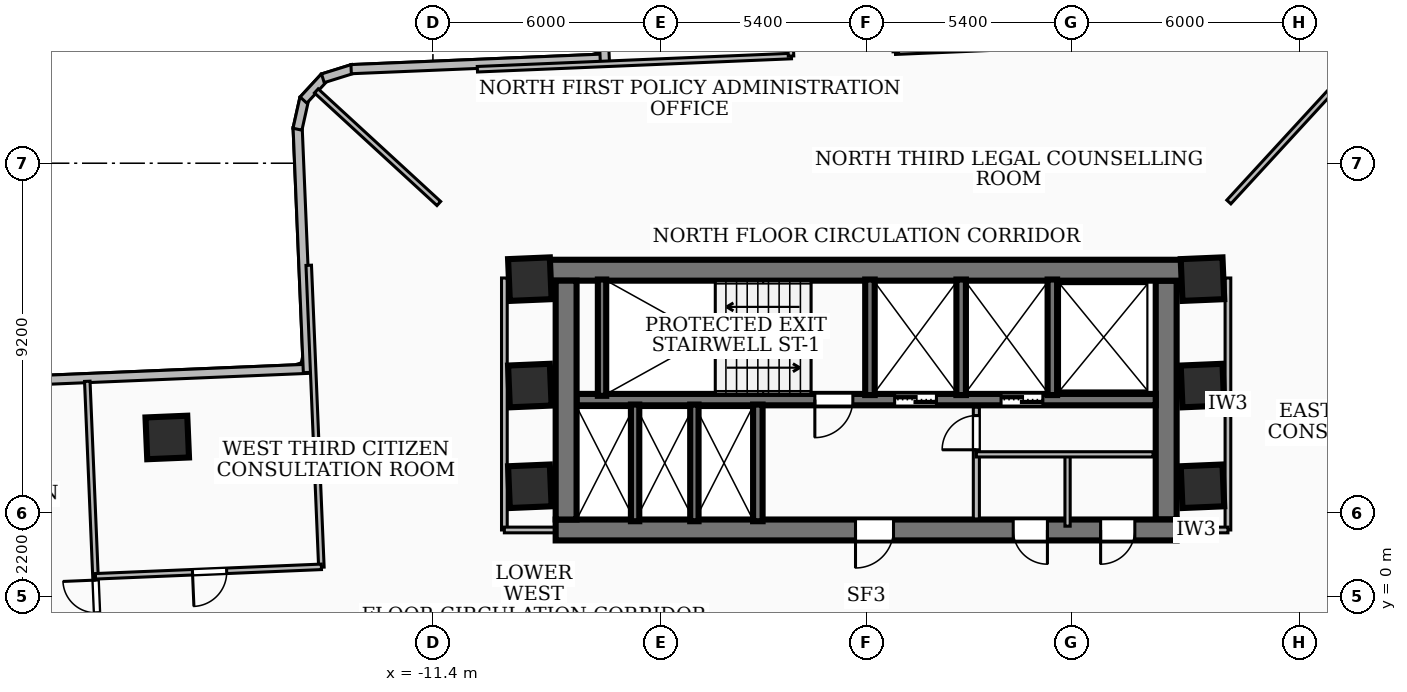
"""IFC4 building model, lengths in metres.
Left out: names, types, materials, properties, quantities, classifications, styles, units other than length and angle.
Written with IfcOpenShell. Run it as: python <this file> out.ifc"""

import sys

from ifc_helpers import new_model, si_unit, direction, frame, frame_2d, origin, origin_2d, place, context, subcontext, project, spatial, rectangle, extrude, element, fill, save


model = new_model("IFC4")
c1 = context("Model", 3, precision=1e-05, world=origin(), true_north=direction((0.0, 1.0)))
c2 = subcontext(c1, "Body", "Model", "MODEL_VIEW")
j1 = project(units=[si_unit("LENGTHUNIT", "METRE"), si_unit("PLANEANGLEUNIT", "RADIAN")], contexts=[c1])
p1 = place(None, origin())
s1 = spatial("IfcSite", under=j1, at=p1, CompositionType="ELEMENT")
p2 = place(p1, origin())
s2 = spatial("IfcBuilding", under=s1, at=p2, CompositionType="ELEMENT")
p3 = place(p2, frame((0.0, 0.0, 46.08)))
s3 = spatial("IfcBuildingStorey", under=s2, at=p3, CompositionType="ELEMENT", Elevation=46.08)
p4 = place(p3, frame((-8.78, 8.585, 0.0), z_axis=(0.0, 0.0, 1.0), x_axis=(1.0, 0.0, 0.0)))
e1 = element("IfcWall", 1, at=p4, inside=s3, PredefinedType="SHEAR", context=c2, shape_type="SweptSolid", body=[
    extrude(rectangle(XDim=17.56, YDim=0.55, at=frame_2d((8.78, 0.0))), origin(), (0.0, 0.0, 1.0), 3.32),
])
p5 = place(p3, frame((8.17, 1.75, 0.0), z_axis=(0.0, 0.0, 1.0), x_axis=(-1.0, 0.0, 0.0)))
e2 = element("IfcWall", 2, at=p5, inside=s3, PredefinedType="SHEAR", context=c2, shape_type="SweptSolid", body=[
    extrude(rectangle(XDim=16.34, YDim=0.55, at=frame_2d((8.17, 0.0))), origin(), (0.0, 0.0, 1.0), 3.32),
])
p6 = place(p5, frame((7.45, 0.0, 0.0)))
e3 = element("IfcOpeningElement", 3, at=p6, cuts=e2, PredefinedType="OPENING", context=c2, shape_type="SweptSolid", body=[
    extrude(rectangle(XDim=1.0, YDim=2.1, at=frame_2d((0.5, 1.05))), frame((0.0, 0.285, 0.0), z_axis=(0.0, -1.0, 0.0), x_axis=(1.0, 0.0, 0.0)), (0.0, 0.0, 1.0), 0.57),
])
p7 = place(p5, frame((3.4, 0.0, 0.0)))
e4 = element("IfcOpeningElement", 4, at=p7, cuts=e2, PredefinedType="OPENING", context=c2, shape_type="SweptSolid", body=[
    extrude(rectangle(XDim=0.9, YDim=2.06, at=frame_2d((0.45, 1.03))), frame((0.0, 0.285, 0.0), z_axis=(0.0, -1.0, 0.0), x_axis=(1.0, 0.0, 0.0)), (0.0, 0.0, 1.0), 0.57),
])
p8 = place(p5, frame((1.1, 0.0, 0.0)))
e5 = element("IfcOpeningElement", 5, at=p8, cuts=e2, PredefinedType="OPENING", context=c2, shape_type="SweptSolid", body=[
    extrude(rectangle(XDim=0.9, YDim=2.06, at=frame_2d((0.45, 1.03))), frame((0.0, 0.285, 0.0), z_axis=(0.0, -1.0, 0.0), x_axis=(1.0, 0.0, 0.0)), (0.0, 0.0, 1.0), 0.57),
])
for number, where, z_axis, x_axis in (
    (6, (-7.895, 2.025, 0.0), (0.0, 0.0, 1.0), (0.0, 1.0, 0.0)),
    (7, (7.895, 8.31, 0.0), (0.0, 0.0, 1.0), (0.0, -1.0, 0.0)),
):
    element("IfcWall", number, at=place(p3, frame(where, z_axis=z_axis, x_axis=x_axis)), inside=s3, PredefinedType="SHEAR", context=c2, shape_type="SweptSolid", body=[
        extrude(rectangle(XDim=6.285, YDim=0.55, at=frame_2d((3.143, 0.0))), origin(), (0.0, 0.0, 1.0), 3.32),
    ])
p9 = place(p3, frame((7.62, 5.18, 0.0), z_axis=(0.0, 0.0, 1.0), x_axis=(-1.0, 0.0, 0.0)))
e8 = element("IfcWall", 8, at=p9, inside=s3, PredefinedType="SOLIDWALL", context=c2, shape_type="SweptSolid", body=[
    extrude(rectangle(XDim=15.24, YDim=0.3, at=frame_2d((7.62, 0.0))), origin(), (0.0, 0.0, 1.0), 3.32),
])
p10 = place(p9, frame((5.77, 0.0, 0.0)))
e9 = element("IfcOpeningElement", 9, at=p10, cuts=e8, PredefinedType="OPENING", context=c2, shape_type="SweptSolid", body=[
    extrude(rectangle(XDim=1.1, YDim=2.15, at=frame_2d((0.55, 1.075))), frame((0.0, 0.16, 0.0), z_axis=(0.0, -1.0, 0.0), x_axis=(1.0, 0.0, 0.0)), (0.0, 0.0, 1.0), 0.32),
])
p11 = place(p9, frame((2.97, 0.0, 0.0)))
e10 = element("IfcOpeningElement", 10, at=p11, cuts=e8, PredefinedType="OPENING", context=c2, shape_type="SweptSolid", body=[
    extrude(rectangle(XDim=1.1, YDim=2.15, at=frame_2d((0.55, 1.075))), frame((0.0, 0.16, 0.0), z_axis=(0.0, -1.0, 0.0), x_axis=(1.0, 0.0, 0.0)), (0.0, 0.0, 1.0), 0.32),
])
p12 = place(p9, frame((7.97, 0.0, 0.0)))
e11 = element("IfcOpeningElement", 11, at=p12, cuts=e8, PredefinedType="OPENING", context=c2, shape_type="SweptSolid", body=[
    extrude(rectangle(XDim=1.0, YDim=2.1, at=frame_2d((0.5, 1.05))), frame((0.0, 0.16, 0.0), z_axis=(0.0, -1.0, 0.0), x_axis=(1.0, 0.0, 0.0)), (0.0, 0.0, 1.0), 0.32),
])
p13 = place(p3, frame((-6.95, 5.28, 0.0), z_axis=(0.0, 0.0, 1.0), x_axis=(0.0, 1.0, 0.0)))
e12 = element("IfcWall", 12, at=p13, inside=s3, PredefinedType="SOLIDWALL", context=c2, shape_type="SweptSolid", body=[
    extrude(rectangle(XDim=3.06, YDim=0.22, at=frame_2d((1.53, 0.0))), origin(), (0.0, 0.0, 1.0), 3.32),
])
for number, where, z_axis, x_axis in (
    (13, (0.1, 5.3, 0.0), (0.0, 0.0, 1.0), (0.0, 1.0, 0.0)),
    (14, (2.5, 5.3, 0.0), (0.0, 0.0, 1.0), (0.0, 1.0, 0.0)),
    (15, (4.9, 5.3, 0.0), (0.0, 0.0, 1.0), (0.0, 1.0, 0.0)),
):
    element("IfcWall", number, at=place(p3, frame(where, z_axis=z_axis, x_axis=x_axis)), inside=s3, PredefinedType="SOLIDWALL", context=c2, shape_type="SweptSolid", body=[
        extrude(rectangle(XDim=3.04, YDim=0.25, at=frame_2d((1.52, 0.0))), origin(), (0.0, 0.0, 1.0), 3.32),
    ])
p14 = place(p3, frame((-2.85, 1.98, 0.0), z_axis=(0.0, 0.0, 1.0), x_axis=(0.0, 1.0, 0.0)))
e16 = element("IfcWall", 16, at=p14, inside=s3, PredefinedType="SOLIDWALL", context=c2, shape_type="SweptSolid", body=[
    extrude(rectangle(XDim=3.07, YDim=0.25, at=frame_2d((1.535, 0.0))), origin(), (0.0, 0.0, 1.0), 3.32),
])
for number, where, z_axis, x_axis in (
    (17, (-6.08, 1.98, 0.0), (0.0, 0.0, 1.0), (0.0, 1.0, 0.0)),
    (18, (-4.52, 1.98, 0.0), (0.0, 0.0, 1.0), (0.0, 1.0, 0.0)),
):
    element("IfcWall", number, at=place(p3, frame(where, z_axis=z_axis, x_axis=x_axis)), inside=s3, PredefinedType="SOLIDWALL", context=c2, shape_type="SweptSolid", body=[
        extrude(rectangle(XDim=3.07, YDim=0.22, at=frame_2d((1.535, 0.0))), origin(), (0.0, 0.0, 1.0), 3.32),
    ])
for number, where, z_axis, x_axis in (
    (19, (-8.85, 2.9, 0.0), (0.0, 0.0, 1.0), (0.999, 0.042, 0.0)),
    (20, (-8.85, 5.55, 0.0), (0.0, 0.0, 1.0), (0.999, 0.042, 0.0)),
    (21, (8.85, 2.9, 0.0), (0.0, 0.0, 1.0), (0.999, 0.042, 0.0)),
    (22, (8.85, 5.55, 0.0), (0.0, 0.0, 1.0), (0.999, 0.042, 0.0)),
    (23, (-8.85, 8.35, 0.0), (0.0, 0.0, 1.0), (0.999, 0.042, 0.0)),
    (24, (8.85, 8.35, 0.0), (0.0, 0.0, 1.0), (0.999, 0.042, 0.0)),
    (25, (-18.391, 4.184, 0.0), (0.0, 0.0, 1.0), (0.999, 0.042, 0.0)),
):
    element("IfcColumn", number, at=place(p3, frame(where, z_axis=z_axis, x_axis=x_axis)), inside=s3, PredefinedType="COLUMN", context=c2, shape_type="SweptSolid", body=[
        extrude(rectangle(XDim=1.1, YDim=1.1, at=origin_2d()), origin(), (0.0, 0.0, 1.0), 3.6),
    ])
p15 = place(p3, frame((-31.458, 5.287, 0.0), z_axis=(0.0, 0.0, 1.0), x_axis=(0.999122484842, 0.041883890494, 0.0)))
e26 = element("IfcWall", 26, at=p15, inside=s3, PredefinedType="SOLIDWALL", context=c2, shape_type="SweptSolid", body=[
    extrude(rectangle(XDim=16.875, YDim=0.24, at=frame_2d((8.438, 0.0))), origin(), (0.0, 0.0, 1.0), 3.32),
])
p16 = place(p15, frame((1.1, 0.0, 0.85)))
e27 = element("IfcOpeningElement", 27, at=p16, cuts=e26, PredefinedType="OPENING", context=c2, shape_type="SweptSolid", body=[
    extrude(rectangle(XDim=2.1, YDim=1.8, at=frame_2d((1.05, 0.9))), frame((0.0, 0.13, 0.0), z_axis=(0.0, -1.0, 0.0), x_axis=(1.0, 0.0, 0.0)), (0.0, 0.0, 1.0), 0.26),
])
p17 = place(p3, frame((-14.69, 5.894, 0.0), z_axis=(0.0, 0.0, 1.0), x_axis=(-0.041827173477, 0.999124860845, 0.0)))
e28 = element("IfcWall", 28, at=p17, inside=s3, PredefinedType="SOLIDWALL", context=c2, shape_type="SweptSolid", body=[
    extrude(rectangle(XDim=6.456, YDim=0.24, at=frame_2d((3.228, 0.0))), origin(), (0.0, 0.0, 1.0), 3.32),
])
p18 = place(p3, frame((-14.964, 12.295, 0.0), z_axis=(0.0, 0.0, 1.0), x_axis=(0.21736704137, 0.976089939158, 0.0)))
e29 = element("IfcWall", 29, at=p18, inside=s3, PredefinedType="SOLIDWALL", context=c2, shape_type="SweptSolid", body=[
    extrude(rectangle(XDim=0.829, YDim=0.24, at=frame_2d((0.415, 0.0))), origin(), (0.0, 0.0, 1.0), 3.32),
])
p19 = place(p3, frame((-14.806, 13.062, 0.0), z_axis=(0.0, 0.0, 1.0), x_axis=(0.677693750404, 0.735344259965, 0.0)))
e30 = element("IfcWall", 30, at=p19, inside=s3, PredefinedType="SOLIDWALL", context=c2, shape_type="SweptSolid", body=[
    extrude(rectangle(XDim=0.813, YDim=0.24, at=frame_2d((0.406, 0.0))), origin(), (0.0, 0.0, 1.0), 3.32),
])
p20 = place(p3, frame((-14.296, 13.635, 0.0), z_axis=(0.0, 0.0, 1.0), x_axis=(0.954396284631, 0.298542680168, 0.0)))
e31 = element("IfcWall", 31, at=p20, inside=s3, PredefinedType="SOLIDWALL", context=c2, shape_type="SweptSolid", body=[
    extrude(rectangle(XDim=0.831, YDim=0.24, at=frame_2d((0.416, 0.0))), origin(), (0.0, 0.0, 1.0), 3.32),
])
p21 = place(p3, frame((-13.552, 13.875, 0.0), z_axis=(0.0, 0.0, 1.0), x_axis=(0.999127443157, 0.041765444226, 0.0)))
e32 = element("IfcWall", 32, at=p21, inside=s3, PredefinedType="SOLIDWALL", context=c2, shape_type="SweptSolid", body=[
    extrude(rectangle(XDim=6.775, YDim=0.24, at=frame_2d((3.387, 0.0))), origin(), (0.0, 0.0, 1.0), 3.32),
])
p22 = place(p3, frame((-6.875, 14.058, 0.0), z_axis=(0.0, 0.0, 1.0), x_axis=(-0.041850586852, 0.999123880397, 0.0)))
e33 = element("IfcWall", 33, at=p22, inside=s3, PredefinedType="SOLIDWALL", context=c2, shape_type="SweptSolid", body=[
    extrude(rectangle(XDim=13.476, YDim=0.24, at=frame_2d((6.738, 0.0))), origin(), (0.0, 0.0, 1.0), 3.32),
])
p23 = place(p22, frame((10.276, 0.0, 0.85)))
e34 = element("IfcOpeningElement", 34, at=p23, cuts=e33, PredefinedType="OPENING", context=c2, shape_type="SweptSolid", body=[
    extrude(rectangle(XDim=2.1, YDim=2.0, at=frame_2d((1.05, 1.0))), frame((0.0, 0.13, 0.0), z_axis=(0.0, -1.0, 0.0), x_axis=(1.0, 0.0, 0.0)), (0.0, 0.0, 1.0), 0.26),
])
p24 = place(p3, frame((2.9, 2.04, 0.0), z_axis=(0.0, 0.0, 1.0), x_axis=(0.0, 1.0, 0.0)))
e35 = element("IfcWall", 35, at=p24, inside=s3, PredefinedType="PARTITIONING", context=c2, shape_type="SweptSolid", body=[
    extrude(rectangle(XDim=2.94, YDim=0.16, at=frame_2d((1.47, 0.0))), origin(), (0.0, 0.0, 1.0), 2.385),
])
p25 = place(p24, frame((1.82, 0.0, 0.0)))
e36 = element("IfcOpeningElement", 36, at=p25, cuts=e35, PredefinedType="OPENING", context=c2, shape_type="SweptSolid", body=[
    extrude(rectangle(XDim=0.9, YDim=2.06, at=frame_2d((0.45, 1.03))), frame((0.0, 0.09, 0.0), z_axis=(0.0, -1.0, 0.0), x_axis=(1.0, 0.0, 0.0)), (0.0, 0.0, 1.0), 0.18),
])
p26 = place(p3, frame((2.9, 3.74, 0.0), z_axis=(0.0, 0.0, 1.0), x_axis=(1.0, 0.0, 0.0)))
e37 = element("IfcWall", 37, at=p26, inside=s3, PredefinedType="PARTITIONING", context=c2, shape_type="SweptSolid", body=[
    extrude(rectangle(XDim=4.65, YDim=0.138, at=frame_2d((2.325, 0.0))), origin(), (0.0, 0.0, 1.0), 3.32),
])
p27 = place(p3, frame((5.3, 1.85, 0.0), z_axis=(0.0, 0.0, 1.0), x_axis=(0.0, 1.0, 0.0)))
e38 = element("IfcWall", 38, at=p27, inside=s3, PredefinedType="PARTITIONING", context=c2, shape_type="SweptSolid", body=[
    extrude(rectangle(XDim=1.89, YDim=0.138, at=frame_2d((0.945, 0.0))), origin(), (0.0, 0.0, 1.0), 2.385),
])
p28 = place(p3, frame((-9.52, 1.75, 0.0), z_axis=(0.0, 0.0, 1.0), x_axis=(0.0, 1.0, 0.0)))
e39 = element("IfcWall", 39, at=p28, inside=s3, PredefinedType="PARTITIONING", context=c2, shape_type="SweptSolid", body=[
    extrude(rectangle(XDim=6.63, YDim=0.15, at=frame_2d((3.315, 0.0))), origin(), (0.0, 0.0, 1.0), 2.401),
])
p29 = place(p3, frame((-7.85, 1.75, 0.0), z_axis=(0.0, 0.0, 1.0), x_axis=(-1.0, 0.0, 0.0)))
e40 = element("IfcWall", 40, at=p29, inside=s3, PredefinedType="PARTITIONING", context=c2, shape_type="SweptSolid", body=[
    extrude(rectangle(XDim=1.67, YDim=0.15, at=frame_2d((0.835, 0.0))), origin(), (0.0, 0.0, 1.0), 2.385),
])
p30 = place(p3, frame((9.52, 1.75, 0.0), z_axis=(0.0, 0.0, 1.0), x_axis=(0.0, 1.0, 0.0)))
e41 = element("IfcWall", 41, at=p30, inside=s3, PredefinedType="PARTITIONING", context=c2, shape_type="SweptSolid", body=[
    extrude(rectangle(XDim=6.63, YDim=0.15, at=frame_2d((3.315, 0.0))), origin(), (0.0, 0.0, 1.0), 2.401),
])
p31 = place(p3, frame((7.85, 1.75, 0.0), z_axis=(0.0, 0.0, 1.0), x_axis=(1.0, 0.0, 0.0)))
e42 = element("IfcWall", 42, at=p31, inside=s3, PredefinedType="PARTITIONING", context=c2, shape_type="SweptSolid", body=[
    extrude(rectangle(XDim=1.67, YDim=0.15, at=frame_2d((0.835, 0.0))), origin(), (0.0, 0.0, 1.0), 2.385),
])
p32 = place(p3, frame((9.544, 10.38, 0.0), z_axis=(0.0, 0.0, 1.0), x_axis=(0.676856513188, 0.736114977809, 0.0)))
e43 = element("IfcWall", 43, at=p32, inside=s3, PredefinedType="PARTITIONING", context=c2, shape_type="SweptSolid", body=[
    extrude(rectangle(XDim=5.554, YDim=0.145, at=frame_2d((2.777, 0.0))), origin(), (0.0, 0.0, 1.0), 2.624),
])
p33 = place(p3, frame((-11.245, 10.34, 0.0), z_axis=(0.0, 0.0, 1.0), x_axis=(-0.736178820698, 0.676787074312, 0.0)))
e44 = element("IfcWall", 44, at=p33, inside=s3, PredefinedType="PARTITIONING", context=c2, shape_type="SweptSolid", body=[
    extrude(rectangle(XDim=4.378, YDim=0.145, at=frame_2d((2.189, 0.0))), origin(), (0.0, 0.0, 1.0), 3.32),
])
p34 = place(p3, frame((-1.967, 14.22, 0.0), z_axis=(0.0, 0.0, 1.0), x_axis=(-0.99911977153, -0.041948565382, 0.0)))
e45 = element("IfcWall", 45, at=p34, inside=s3, PredefinedType="PARTITIONING", context=c2, shape_type="SweptSolid", body=[
    extrude(rectangle(XDim=8.27, YDim=0.145, at=frame_2d((4.135, 0.0))), origin(), (0.0, 0.0, 1.0), 2.401),
])
p35 = place(p3, frame((8.714, 14.668, 0.0), z_axis=(0.0, 0.0, 1.0), x_axis=(-0.999122557945, -0.041882146625, 0.0)))
e46 = element("IfcWall", 46, at=p35, inside=s3, PredefinedType="PARTITIONING", context=c2, shape_type="SweptSolid", body=[
    extrude(rectangle(XDim=7.951, YDim=0.145, at=frame_2d((3.976, 0.0))), origin(), (0.0, 0.0, 1.0), 2.401),
])
p36 = place(p3, frame((-2.249, 20.714, 0.0), z_axis=(0.0, 0.0, 1.0), x_axis=(0.041843020894, -0.999124197286, 0.0)))
e47 = element("IfcWall", 47, at=p36, inside=s3, PredefinedType="PARTITIONING", context=c2, shape_type="SweptSolid", body=[
    extrude(rectangle(XDim=6.5, YDim=0.145, at=frame_2d((3.25, 0.0))), origin(), (0.0, 0.0, 1.0), 3.32),
])
p37 = place(p36, frame((4.575, 0.0, 0.0)))
e48 = element("IfcOpeningElement", 48, at=p37, cuts=e47, PredefinedType="OPENING", context=c2, shape_type="SweptSolid", body=[
    extrude(rectangle(XDim=0.86, YDim=2.04, at=frame_2d((0.43, 1.02))), frame((0.0, 0.083, 0.0), z_axis=(0.0, -1.0, 0.0), x_axis=(1.0, 0.0, 0.0)), (0.0, 0.0, 1.0), 0.165),
])
p38 = place(p36, frame((1.325, 0.0, 0.0)))
e49 = element("IfcOpeningElement", 49, at=p38, cuts=e47, PredefinedType="OPENING", context=c2, shape_type="SweptSolid", body=[
    extrude(rectangle(XDim=0.86, YDim=2.04, at=frame_2d((0.43, 1.02))), frame((0.0, 0.083, 0.0), z_axis=(0.0, -1.0, 0.0), x_axis=(1.0, 0.0, 0.0)), (0.0, 0.0, 1.0), 0.165),
])
p39 = place(p3, frame((-14.668, 8.714, 0.0), z_axis=(0.0, 0.0, 1.0), x_axis=(0.041882146625, -0.999122557945, 0.0)))
e50 = element("IfcWall", 50, at=p39, inside=s3, PredefinedType="PARTITIONING", context=c2, shape_type="SweptSolid", body=[
    extrude(rectangle(XDim=7.951, YDim=0.145, at=frame_2d((3.976, 0.0))), origin(), (0.0, 0.0, 1.0), 2.401),
])
p40 = place(p3, frame((-14.335, 0.78, 0.0), z_axis=(0.0, 0.0, 1.0), x_axis=(-0.999123875731, -0.041850698257, 0.0)))
e51 = element("IfcWall", 51, at=p40, inside=s3, PredefinedType="PARTITIONING", context=c2, shape_type="SweptSolid", body=[
    extrude(rectangle(XDim=5.95, YDim=0.145, at=frame_2d((2.975, 0.0))), origin(), (0.0, 0.0, 1.0), 3.32),
])
p41 = place(p40, frame((2.495, 0.0, 0.0)))
e52 = element("IfcOpeningElement", 52, at=p41, cuts=e51, PredefinedType="OPENING", context=c2, shape_type="SweptSolid", body=[
    extrude(rectangle(XDim=0.9, YDim=2.06, at=frame_2d((0.45, 1.03))), frame((0.0, 0.083, 0.0), z_axis=(0.0, -1.0, 0.0), x_axis=(1.0, 0.0, 0.0)), (0.0, 0.0, 1.0), 0.165),
])
p42 = place(p3, frame((-19.963, -7.037, 0.0), z_axis=(0.0, 0.0, 1.0), x_axis=(-0.041873423051, 0.999122923589, 0.0)))
e53 = element("IfcWall", 53, at=p42, inside=s3, PredefinedType="PARTITIONING", context=c2, shape_type="SweptSolid", body=[
    extrude(rectangle(XDim=12.71, YDim=0.145, at=frame_2d((6.355, 0.0))), origin(), (0.0, 0.0, 1.0), 2.401),
])
p43 = place(p42, frame((6.615, 0.0, 0.0)))
e54 = element("IfcOpeningElement", 54, at=p43, cuts=e53, PredefinedType="OPENING", context=c2, shape_type="SweptSolid", body=[
    extrude(rectangle(XDim=0.86, YDim=2.04, at=frame_2d((0.43, 1.02))), frame((0.0, 0.083, 0.0), z_axis=(0.0, -1.0, 0.0), x_axis=(1.0, 0.0, 0.0)), (0.0, 0.0, 1.0), 0.165),
])
p44 = place(p42, frame((5.415, 0.0, 0.0)))
e55 = element("IfcOpeningElement", 55, at=p44, cuts=e53, PredefinedType="OPENING", context=c2, shape_type="SweptSolid", body=[
    extrude(rectangle(XDim=0.86, YDim=2.04, at=frame_2d((0.43, 1.02))), frame((0.0, 0.083, 0.0), z_axis=(0.0, -1.0, 0.0), x_axis=(1.0, 0.0, 0.0)), (0.0, 0.0, 1.0), 0.165),
])
p45 = place(p6, origin())
e56 = element("IfcDoor", 56, at=p45, inside=s3, OperationType="SINGLE_SWING_RIGHT", PredefinedType="DOOR", context=c2, shape_type="SweptSolid", body=[
    extrude(rectangle(XDim=1.0, YDim=2.1, at=frame_2d((0.5, 1.05))), frame((0.0, 0.025, 0.0), z_axis=(0.0, -1.0, 0.0), x_axis=(1.0, 0.0, 0.0)), (0.0, 0.0, 1.0), 0.05),
])
fill(e3, e56)
p46 = place(p10, origin())
e57 = element("IfcDoor", 57, at=p46, inside=s3, OperationType="DOUBLE_DOOR_SLIDING", PredefinedType="DOOR", context=c2, shape_type="SweptSolid", body=[
    extrude(rectangle(XDim=1.1, YDim=2.15, at=frame_2d((0.55, 1.075))), frame((0.0, 0.025, 0.0), z_axis=(0.0, -1.0, 0.0), x_axis=(1.0, 0.0, 0.0)), (0.0, 0.0, 1.0), 0.05),
])
fill(e9, e57)
p47 = place(p11, origin())
e58 = element("IfcDoor", 58, at=p47, inside=s3, OperationType="DOUBLE_DOOR_SLIDING", PredefinedType="DOOR", context=c2, shape_type="SweptSolid", body=[
    extrude(rectangle(XDim=1.1, YDim=2.15, at=frame_2d((0.55, 1.075))), frame((0.0, 0.025, 0.0), z_axis=(0.0, -1.0, 0.0), x_axis=(1.0, 0.0, 0.0)), (0.0, 0.0, 1.0), 0.05),
])
fill(e10, e58)
p48 = place(p12, origin())
e59 = element("IfcDoor", 59, at=p48, inside=s3, OperationType="SINGLE_SWING_RIGHT", PredefinedType="DOOR", context=c2, shape_type="SweptSolid", body=[
    extrude(rectangle(XDim=1.0, YDim=2.1, at=frame_2d((0.5, 1.05))), frame((0.0, 0.025, 0.0), z_axis=(0.0, -1.0, 0.0), x_axis=(1.0, 0.0, 0.0)), (0.0, 0.0, 1.0), 0.05),
])
fill(e11, e59)
p49 = place(p7, origin())
e60 = element("IfcDoor", 60, at=p49, inside=s3, OperationType="SINGLE_SWING_LEFT", PredefinedType="DOOR", context=c2, shape_type="SweptSolid", body=[
    extrude(rectangle(XDim=0.9, YDim=2.06, at=frame_2d((0.45, 1.03))), frame((0.0, 0.025, 0.0), z_axis=(0.0, -1.0, 0.0), x_axis=(1.0, 0.0, 0.0)), (0.0, 0.0, 1.0), 0.05),
])
fill(e4, e60)
p50 = place(p8, origin())
e61 = element("IfcDoor", 61, at=p50, inside=s3, OperationType="SINGLE_SWING_RIGHT", PredefinedType="DOOR", context=c2, shape_type="SweptSolid", body=[
    extrude(rectangle(XDim=0.9, YDim=2.06, at=frame_2d((0.45, 1.03))), frame((0.0, 0.025, 0.0), z_axis=(0.0, -1.0, 0.0), x_axis=(1.0, 0.0, 0.0)), (0.0, 0.0, 1.0), 0.05),
])
fill(e5, e61)
p51 = place(p25, origin())
e62 = element("IfcDoor", 62, at=p51, inside=s3, OperationType="SINGLE_SWING_LEFT", PredefinedType="DOOR", context=c2, shape_type="SweptSolid", body=[
    extrude(rectangle(XDim=0.9, YDim=2.06, at=frame_2d((0.45, 1.03))), frame((0.0, 0.025, 0.0), z_axis=(0.0, -1.0, 0.0), x_axis=(1.0, 0.0, 0.0)), (0.0, 0.0, 1.0), 0.05),
])
fill(e36, e62)
p52 = place(p41, origin())
e63 = element("IfcDoor", 63, at=p52, inside=s3, OperationType="SINGLE_SWING_RIGHT", PredefinedType="DOOR", context=c2, shape_type="SweptSolid", body=[
    extrude(rectangle(XDim=0.9, YDim=2.06, at=frame_2d((0.45, 1.03))), frame((0.0, 0.025, 0.0), z_axis=(0.0, -1.0, 0.0), x_axis=(1.0, 0.0, 0.0)), (0.0, 0.0, 1.0), 0.05),
])
fill(e52, e63)
p53 = place(p43, origin())
e64 = element("IfcDoor", 64, at=p53, inside=s3, OperationType="SINGLE_SWING_RIGHT", PredefinedType="DOOR", context=c2, shape_type="SweptSolid", body=[
    extrude(rectangle(XDim=0.86, YDim=2.04, at=frame_2d((0.43, 1.02))), frame((0.0, 0.025, 0.0), z_axis=(0.0, -1.0, 0.0), x_axis=(1.0, 0.0, 0.0)), (0.0, 0.0, 1.0), 0.05),
])
fill(e54, e64)
save(model, sys.argv[1])
